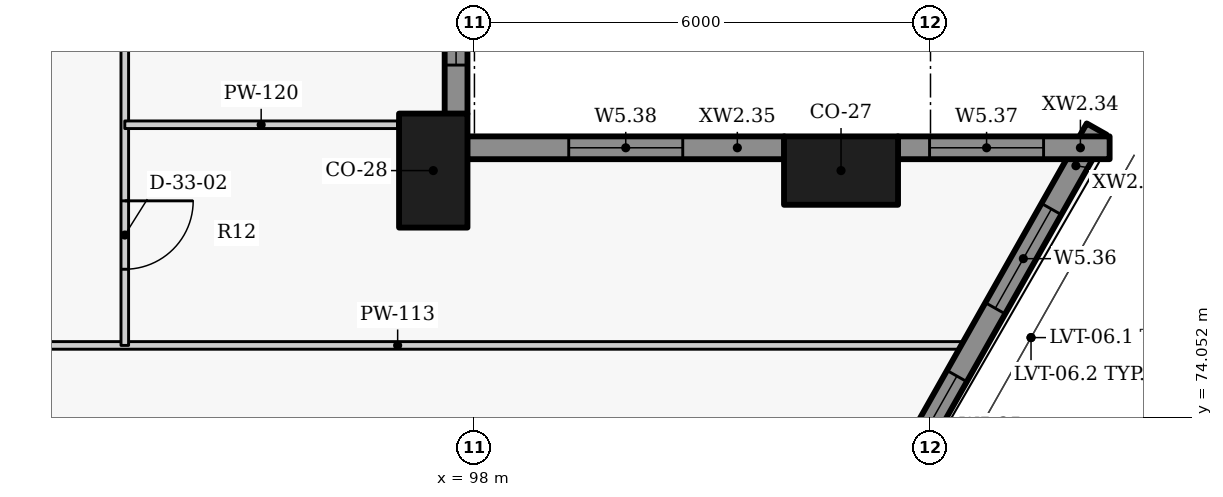
"""IFC4 building model, lengths in metres.
Left out: names, types, materials, properties, quantities, classifications, styles, units other than length and angle.
Written with IfcOpenShell. Run it as: python <this file> out.ifc"""

import sys

from ifc_helpers import new_model, si_unit, direction, frame, frame_2d, origin, origin_2d, place, context, subcontext, project, spatial, rectangle, extrude, element, fill, save


model = new_model("IFC4")
c1 = context("Model", 3, precision=1e-05, world=origin(), true_north=direction((0.0, 1.0)))
c2 = subcontext(c1, "Body", "Model", "MODEL_VIEW")
j1 = project(units=[si_unit("LENGTHUNIT", "METRE"), si_unit("PLANEANGLEUNIT", "RADIAN")], contexts=[c1])
p1 = place(None, origin())
s1 = spatial("IfcSite", under=j1, at=p1, CompositionType="ELEMENT")
p2 = place(p1, origin())
s2 = spatial("IfcBuilding", under=s1, at=p2, CompositionType="ELEMENT")
p3 = place(p2, frame((0.0, 0.0, 61.2)))
s3 = spatial("IfcBuildingStorey", under=s2, at=p3, CompositionType="ELEMENT", Elevation=61.2)
for number, where, z_axis, x_axis in (
    (1, (102.823, 77.3, 0.0), (0.0, 0.0, 1.0), (-1.0, 0.0, 0.0)),
    (2, (97.458, 77.3, 0.0), (0.0, 0.0, 1.0), (0.0, 1.0, 0.0)),
):
    element("IfcColumn", number, at=place(p3, frame(where, z_axis=z_axis, x_axis=x_axis)), inside=s3, PredefinedType="COLUMN", context=c2, shape_type="SweptSolid", body=[
        extrude(rectangle(XDim=1.5, YDim=0.9, at=origin_2d()), origin(), (0.0, 0.0, 1.0), 3.3),
    ])
p4 = place(p3, frame((103.416, 72.949, 0.0), z_axis=(0.0, 0.0, 1.0), x_axis=(0.492363204642, 0.870389840655, 0.0)))
e3 = element("IfcWall", 3, at=p4, inside=s3, PredefinedType="SOLIDWALL", context=c2, shape_type="SweptSolid", body=[
    extrude(rectangle(XDim=5.626, YDim=0.3, at=frame_2d((2.813, 0.0))), origin(), (0.0, 0.0, 1.0), 2.425),
])
p5 = place(p4, frame((0.393, 0.0, 0.9)))
e4 = element("IfcOpeningElement", 4, at=p5, cuts=e3, PredefinedType="OPENING", context=c2, shape_type="SweptSolid", body=[
    extrude(rectangle(XDim=1.5, YDim=1.1, at=frame_2d((0.75, 0.55))), frame((0.0, 0.16, 0.0), z_axis=(0.0, -1.0, 0.0), x_axis=(1.0, 0.0, 0.0)), (0.0, 0.0, 1.0), 0.32),
])
p6 = place(p4, frame((2.917, 0.0, 0.9)))
e5 = element("IfcOpeningElement", 5, at=p6, cuts=e3, PredefinedType="OPENING", context=c2, shape_type="SweptSolid", body=[
    extrude(rectangle(XDim=1.5, YDim=1.1, at=frame_2d((0.75, 0.55))), frame((0.0, 0.16, 0.0), z_axis=(0.0, -1.0, 0.0), x_axis=(1.0, 0.0, 0.0)), (0.0, 0.0, 1.0), 0.32),
])
p7 = place(p3, frame((106.357, 77.6, 0.0), z_axis=(0.0, 0.0, 1.0), x_axis=(-1.0, 0.0, 0.0)))
e6 = element("IfcWall", 6, at=p7, inside=s3, PredefinedType="SOLIDWALL", context=c2, shape_type="SweptSolid", body=[
    extrude(rectangle(XDim=2.788, YDim=0.3, at=frame_2d((1.394, 0.0))), origin(), (0.0, 0.0, 1.0), 2.425),
])
p8 = place(p7, frame((0.869, 0.0, 0.9)))
e7 = element("IfcOpeningElement", 7, at=p8, cuts=e6, PredefinedType="OPENING", context=c2, shape_type="SweptSolid", body=[
    extrude(rectangle(XDim=1.5, YDim=1.1, at=frame_2d((0.75, 0.55))), frame((0.0, 0.16, 0.0), z_axis=(0.0, -1.0, 0.0), x_axis=(1.0, 0.0, 0.0)), (0.0, 0.0, 1.0), 0.32),
])
p9 = place(p3, frame((102.077, 77.6, 0.0), z_axis=(0.0, 0.0, 1.0), x_axis=(-1.0, 0.0, 0.0)))
e8 = element("IfcWall", 8, at=p9, inside=s3, PredefinedType="SOLIDWALL", context=c2, shape_type="SweptSolid", body=[
    extrude(rectangle(XDim=4.173, YDim=0.3, at=frame_2d((2.086, 0.0))), origin(), (0.0, 0.0, 1.0), 2.425),
])
p10 = place(p9, frame((1.336, 0.0, 0.9)))
e9 = element("IfcOpeningElement", 9, at=p10, cuts=e8, PredefinedType="OPENING", context=c2, shape_type="SweptSolid", body=[
    extrude(rectangle(XDim=1.5, YDim=1.1, at=frame_2d((0.75, 0.55))), frame((0.0, 0.16, 0.0), z_axis=(0.0, -1.0, 0.0), x_axis=(1.0, 0.0, 0.0)), (0.0, 0.0, 1.0), 0.32),
])
p11 = place(p3, frame((97.758, 78.046, 0.0), z_axis=(0.0, 0.0, 1.0), x_axis=(0.0, 1.0, 0.0)))
e10 = element("IfcWall", 10, at=p11, inside=s3, PredefinedType="SOLIDWALL", context=c2, shape_type="SweptSolid", body=[
    extrude(rectangle(XDim=4.208, YDim=0.3, at=frame_2d((2.104, 0.0))), origin(), (0.0, 0.0, 1.0), 2.425),
])
p12 = place(p11, frame((0.642, 0.0, 0.9)))
e11 = element("IfcOpeningElement", 11, at=p12, cuts=e10, PredefinedType="OPENING", context=c2, shape_type="SweptSolid", body=[
    extrude(rectangle(XDim=1.5, YDim=1.1, at=frame_2d((0.75, 0.55))), frame((0.0, 0.16, 0.0), z_axis=(0.0, -1.0, 0.0), x_axis=(1.0, 0.0, 0.0)), (0.0, 0.0, 1.0), 0.32),
])
p13 = place(p11, frame((3.009, 0.0, 0.9)))
e12 = element("IfcOpeningElement", 12, at=p13, cuts=e10, PredefinedType="OPENING", context=c2, shape_type="SweptSolid", body=[
    extrude(rectangle(XDim=0.9, YDim=1.1, at=frame_2d((0.45, 0.55))), frame((0.0, 0.16, 0.0), z_axis=(0.0, -1.0, 0.0), x_axis=(1.0, 0.0, 0.0)), (0.0, 0.0, 1.0), 0.32),
])
p14 = place(p3, frame((89.5, 75.0, 0.0), z_axis=(0.0, 0.0, 1.0), x_axis=(1.0, 0.0, 0.0)))
e13 = element("IfcWall", 13, at=p14, inside=s3, PredefinedType="PARTITIONING", context=c2, shape_type="SweptSolid", body=[
    extrude(rectangle(XDim=14.979, YDim=0.1, at=frame_2d((7.49, 0.0))), origin(), (0.0, 0.0, 1.0), 2.405),
])
p15 = place(p3, frame((93.4, 94.25, 0.0), z_axis=(0.0, 0.0, 1.0), x_axis=(0.0, -1.0, 0.0)))
e14 = element("IfcWall", 14, at=p15, inside=s3, PredefinedType="PARTITIONING", context=c2, shape_type="SweptSolid", body=[
    extrude(rectangle(XDim=19.25, YDim=0.1, at=frame_2d((9.625, 0.0))), origin(), (0.0, 0.0, 1.0), 3.025),
])
p16 = place(p15, frame((17.348, 0.0, 0.0)))
e15 = element("IfcOpeningElement", 15, at=p16, cuts=e14, PredefinedType="OPENING", context=c2, shape_type="SweptSolid", body=[
    extrude(rectangle(XDim=0.9, YDim=2.1, at=frame_2d((0.45, 1.05))), frame((0.0, 0.06, 0.0), z_axis=(0.0, -1.0, 0.0), x_axis=(1.0, 0.0, 0.0)), (0.0, 0.0, 1.0), 0.12),
])
p17 = place(p15, frame((14.445, 0.0, 0.0)))
e16 = element("IfcOpeningElement", 16, at=p17, cuts=e14, PredefinedType="OPENING", context=c2, shape_type="SweptSolid", body=[
    extrude(rectangle(XDim=0.9, YDim=2.1, at=frame_2d((0.45, 1.05))), frame((0.0, 0.06, 0.0), z_axis=(0.0, -1.0, 0.0), x_axis=(1.0, 0.0, 0.0)), (0.0, 0.0, 1.0), 0.12),
])
p18 = place(p15, frame((10.897, 0.0, 0.0)))
e17 = element("IfcOpeningElement", 17, at=p18, cuts=e14, PredefinedType="OPENING", context=c2, shape_type="SweptSolid", body=[
    extrude(rectangle(XDim=0.9, YDim=2.1, at=frame_2d((0.45, 1.05))), frame((0.0, 0.06, 0.0), z_axis=(0.0, -1.0, 0.0), x_axis=(1.0, 0.0, 0.0)), (0.0, 0.0, 1.0), 0.12),
])
p19 = place(p15, frame((7.4, 0.0, 0.0)))
e18 = element("IfcOpeningElement", 18, at=p19, cuts=e14, PredefinedType="OPENING", context=c2, shape_type="SweptSolid", body=[
    extrude(rectangle(XDim=0.9, YDim=2.1, at=frame_2d((0.45, 1.05))), frame((0.0, 0.06, 0.0), z_axis=(0.0, -1.0, 0.0), x_axis=(1.0, 0.0, 0.0)), (0.0, 0.0, 1.0), 0.12),
])
p20 = place(p15, frame((4.6, 0.0, 0.0)))
e19 = element("IfcOpeningElement", 19, at=p20, cuts=e14, PredefinedType="OPENING", context=c2, shape_type="SweptSolid", body=[
    extrude(rectangle(XDim=0.9, YDim=2.1, at=frame_2d((0.45, 1.05))), frame((0.0, 0.06, 0.0), z_axis=(0.0, -1.0, 0.0), x_axis=(1.0, 0.0, 0.0)), (0.0, 0.0, 1.0), 0.12),
])
p21 = place(p15, frame((1.375, 0.0, 0.0)))
e20 = element("IfcOpeningElement", 20, at=p21, cuts=e14, PredefinedType="OPENING", context=c2, shape_type="SweptSolid", body=[
    extrude(rectangle(XDim=0.9, YDim=2.1, at=frame_2d((0.45, 1.05))), frame((0.0, 0.06, 0.0), z_axis=(0.0, -1.0, 0.0), x_axis=(1.0, 0.0, 0.0)), (0.0, 0.0, 1.0), 0.12),
])
p22 = place(p3, frame((93.4, 77.903, 0.0), z_axis=(0.0, 0.0, 1.0), x_axis=(1.0, 0.0, 0.0)))
e21 = element("IfcWall", 21, at=p22, inside=s3, PredefinedType="PARTITIONING", context=c2, shape_type="SweptSolid", body=[
    extrude(rectangle(XDim=3.588, YDim=0.1, at=frame_2d((1.794, 0.0))), origin(), (0.0, 0.0, 1.0), 3.025),
])
p23 = place(p5, origin())
e22 = element("IfcWindow", 22, at=p23, inside=s3, PartitioningType="SINGLE_PANEL", PredefinedType="WINDOW", context=c2, shape_type="SweptSolid", body=[
    extrude(rectangle(XDim=1.5, YDim=1.1, at=frame_2d((0.75, 0.55))), frame((0.0, 0.03, 0.0), z_axis=(0.0, -1.0, 0.0), x_axis=(1.0, 0.0, 0.0)), (0.0, 0.0, 1.0), 0.06),
])
fill(e4, e22)
p24 = place(p6, origin())
e23 = element("IfcWindow", 23, at=p24, inside=s3, PartitioningType="SINGLE_PANEL", PredefinedType="WINDOW", context=c2, shape_type="SweptSolid", body=[
    extrude(rectangle(XDim=1.5, YDim=1.1, at=frame_2d((0.75, 0.55))), frame((0.0, 0.03, 0.0), z_axis=(0.0, -1.0, 0.0), x_axis=(1.0, 0.0, 0.0)), (0.0, 0.0, 1.0), 0.06),
])
fill(e5, e23)
p25 = place(p8, origin())
e24 = element("IfcWindow", 24, at=p25, inside=s3, PartitioningType="SINGLE_PANEL", PredefinedType="WINDOW", context=c2, shape_type="SweptSolid", body=[
    extrude(rectangle(XDim=1.5, YDim=1.1, at=frame_2d((0.75, 0.55))), frame((0.0, 0.03, 0.0), z_axis=(0.0, -1.0, 0.0), x_axis=(1.0, 0.0, 0.0)), (0.0, 0.0, 1.0), 0.06),
])
fill(e7, e24)
p26 = place(p10, origin())
e25 = element("IfcWindow", 25, at=p26, inside=s3, PartitioningType="SINGLE_PANEL", PredefinedType="WINDOW", context=c2, shape_type="SweptSolid", body=[
    extrude(rectangle(XDim=1.5, YDim=1.1, at=frame_2d((0.75, 0.55))), frame((0.0, 0.03, 0.0), z_axis=(0.0, -1.0, 0.0), x_axis=(1.0, 0.0, 0.0)), (0.0, 0.0, 1.0), 0.06),
])
fill(e9, e25)
p27 = place(p12, origin())
e26 = element("IfcWindow", 26, at=p27, inside=s3, PartitioningType="SINGLE_PANEL", PredefinedType="WINDOW", context=c2, shape_type="SweptSolid", body=[
    extrude(rectangle(XDim=1.5, YDim=1.1, at=frame_2d((0.75, 0.55))), frame((0.0, 0.03, 0.0), z_axis=(0.0, -1.0, 0.0), x_axis=(1.0, 0.0, 0.0)), (0.0, 0.0, 1.0), 0.06),
])
fill(e11, e26)
p28 = place(p16, origin())
e27 = element("IfcDoor", 27, at=p28, inside=s3, OperationType="SINGLE_SWING_LEFT", PredefinedType="DOOR", context=c2, shape_type="SweptSolid", body=[
    extrude(rectangle(XDim=0.9, YDim=2.1, at=frame_2d((0.45, 1.05))), frame((0.0, 0.025, 0.0), z_axis=(0.0, -1.0, 0.0), x_axis=(1.0, 0.0, 0.0)), (0.0, 0.0, 1.0), 0.05),
])
fill(e15, e27)
save(model, sys.argv[1])
